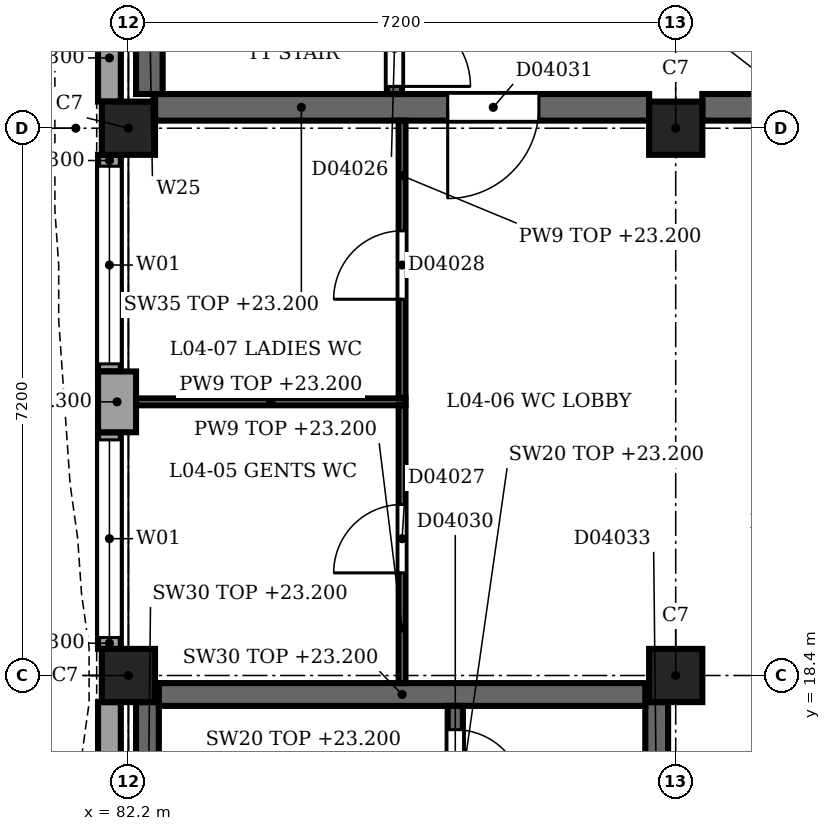
"""IFC4 building model, lengths in metres.
Left out: names, types, materials, properties, quantities, classifications, styles, units other than length and angle.
Written with IfcOpenShell. Run it as: python <this file> out.ifc"""

import sys

from ifc_helpers import new_model, si_unit, direction, frame, frame_2d, origin, origin_2d, place, context, subcontext, project, spatial, rectangle, extrude, element, fill, save


model = new_model("IFC4")
c1 = context("Model", 3, precision=1e-05, world=origin(), true_north=direction((0.0, 1.0)))
c2 = subcontext(c1, "Body", "Model", "MODEL_VIEW")
j1 = project(units=[si_unit("LENGTHUNIT", "METRE"), si_unit("PLANEANGLEUNIT", "RADIAN")], contexts=[c1])
p1 = place(None, origin())
s1 = spatial("IfcSite", under=j1, at=p1, CompositionType="ELEMENT")
p2 = place(p1, origin())
s2 = spatial("IfcBuilding", under=s1, at=p2, CompositionType="ELEMENT")
p3 = place(p2, frame((0.0, 0.0, 18.9)))
s3 = spatial("IfcBuildingStorey", under=s2, at=p3, CompositionType="ELEMENT", Elevation=18.9)
for number, where, z_axis, x_axis in (
    (1, (82.2, 18.4, 0.0), (0.0, 0.0, 1.0), (1.0, 0.0, 0.0)),
    (2, (82.2, 25.6, 0.0), (0.0, 0.0, 1.0), (1.0, 0.0, 0.0)),
    (3, (89.4, 18.4, 0.0), (0.0, 0.0, 1.0), (1.0, 0.0, 0.0)),
    (4, (89.4, 25.6, 0.0), (0.0, 0.0, 1.0), (1.0, 0.0, 0.0)),
):
    element("IfcColumn", number, at=place(p3, frame(where, z_axis=z_axis, x_axis=x_axis)), inside=s3, PredefinedType="COLUMN", context=c2, shape_type="SweptSolid", body=[
        extrude(rectangle(XDim=0.7, YDim=0.7, at=origin_2d()), origin(), (0.0, 0.0, 1.0), 4.5),
    ])
p4 = place(p3, frame((82.05, 21.6, 0.0), z_axis=(0.0, 0.0, 1.0), x_axis=(0.0, 1.0, 0.0)))
e5 = element("IfcWall", 5, at=p4, inside=s3, PredefinedType="SOLIDWALL", context=c2, shape_type="SweptSolid", body=[
    extrude(rectangle(XDim=0.8, YDim=0.5, at=frame_2d((0.4, 0.0))), origin(), (0.0, 0.0, 1.0), 3.4),
])
p5 = place(p3, frame((81.95, 15.2, 0.0), z_axis=(0.0, 0.0, 1.0), x_axis=(0.0, 1.0, 0.0)))
e6 = element("IfcWall", 6, at=p5, inside=s3, PredefinedType="SOLIDWALL", context=c2, shape_type="SweptSolid", body=[
    extrude(rectangle(XDim=2.85, YDim=0.3, at=frame_2d((1.425, 0.0))), origin(), (0.0, 0.0, 1.0), 3.4),
])
p6 = place(p3, frame((81.95, 18.75, 0.0), z_axis=(0.0, 0.0, 1.0), x_axis=(0.0, 1.0, 0.0)))
e7 = element("IfcWall", 7, at=p6, inside=s3, PredefinedType="SOLIDWALL", context=c2, shape_type="SweptSolid", body=[
    extrude(rectangle(XDim=2.85, YDim=0.3, at=frame_2d((1.425, 0.0))), origin(), (0.0, 0.0, 1.0), 3.4),
])
p7 = place(p6, frame((0.15, 0.0, 0.9)))
e8 = element("IfcOpeningElement", 8, at=p7, cuts=e7, PredefinedType="OPENING", context=c2, shape_type="SweptSolid", body=[
    extrude(rectangle(XDim=2.6, YDim=2.4, at=frame_2d((1.3, 1.2))), frame((0.0, 0.16, 0.0), z_axis=(0.0, -1.0, 0.0), x_axis=(1.0, 0.0, 0.0)), (0.0, 0.0, 1.0), 0.32),
])
p8 = place(p3, frame((81.95, 22.4, 0.0), z_axis=(0.0, 0.0, 1.0), x_axis=(0.0, 1.0, 0.0)))
e9 = element("IfcWall", 9, at=p8, inside=s3, PredefinedType="SOLIDWALL", context=c2, shape_type="SweptSolid", body=[
    extrude(rectangle(XDim=2.85, YDim=0.3, at=frame_2d((1.425, 0.0))), origin(), (0.0, 0.0, 1.0), 3.4),
])
p9 = place(p8, frame((0.1, 0.0, 0.9)))
e10 = element("IfcOpeningElement", 10, at=p9, cuts=e9, PredefinedType="OPENING", context=c2, shape_type="SweptSolid", body=[
    extrude(rectangle(XDim=2.6, YDim=2.4, at=frame_2d((1.3, 1.2))), frame((0.0, 0.16, 0.0), z_axis=(0.0, -1.0, 0.0), x_axis=(1.0, 0.0, 0.0)), (0.0, 0.0, 1.0), 0.32),
])
p10 = place(p3, frame((81.95, 25.95, 0.0), z_axis=(0.0, 0.0, 1.0), x_axis=(0.0, 1.0, 0.0)))
e11 = element("IfcWall", 11, at=p10, inside=s3, PredefinedType="SOLIDWALL", context=c2, shape_type="SweptSolid", body=[
    extrude(rectangle(XDim=2.85, YDim=0.3, at=frame_2d((1.425, 0.0))), origin(), (0.0, 0.0, 1.0), 3.4),
])
p11 = place(p10, frame((1.15, 0.0, 1.2)))
e12 = element("IfcOpeningElement", 12, at=p11, cuts=e11, PredefinedType="OPENING", context=c2, shape_type="SweptSolid", body=[
    extrude(rectangle(XDim=0.6, YDim=1.8, at=frame_2d((0.3, 0.9))), frame((0.0, 0.16, 0.0), z_axis=(0.0, -1.0, 0.0), x_axis=(1.0, 0.0, 0.0)), (0.0, 0.0, 1.0), 0.32),
])
p12 = place(p3, frame((82.55, 25.875, 0.0), z_axis=(0.0, 0.0, 1.0), x_axis=(1.0, 0.0, 0.0)))
e13 = element("IfcWall", 13, at=p12, inside=s3, PredefinedType="SHEAR", context=c2, shape_type="SweptSolid", body=[
    extrude(rectangle(XDim=6.5, YDim=0.35, at=frame_2d((3.25, 0.0))), origin(), (0.0, 0.0, 1.0), 4.3),
])
p13 = place(p12, frame((3.85, 0.0, 0.0)))
e14 = element("IfcOpeningElement", 14, at=p13, cuts=e13, PredefinedType="OPENING", context=c2, shape_type="SweptSolid", body=[
    extrude(rectangle(XDim=1.2, YDim=2.1, at=frame_2d((0.6, 1.05))), frame((0.0, 0.185, 0.0), z_axis=(0.0, -1.0, 0.0), x_axis=(1.0, 0.0, 0.0)), (0.0, 0.0, 1.0), 0.37),
])
p14 = place(p3, frame((89.75, 25.875, 0.0), z_axis=(0.0, 0.0, 1.0), x_axis=(1.0, 0.0, 0.0)))
e15 = element("IfcWall", 15, at=p14, inside=s3, PredefinedType="SHEAR", context=c2, shape_type="SweptSolid", body=[
    extrude(rectangle(XDim=6.5, YDim=0.35, at=frame_2d((3.25, 0.0))), origin(), (0.0, 0.0, 1.0), 4.3),
])
p15 = place(p14, frame((2.65, 0.0, 0.0)))
e16 = element("IfcOpeningElement", 16, at=p15, cuts=e15, PredefinedType="OPENING", context=c2, shape_type="SweptSolid", body=[
    extrude(rectangle(XDim=1.8, YDim=2.1, at=frame_2d((0.9, 1.05))), frame((0.0, 0.185, 0.0), z_axis=(0.0, -1.0, 0.0), x_axis=(1.0, 0.0, 0.0)), (0.0, 0.0, 1.0), 0.37),
])
p16 = place(p3, frame((82.475, 26.05, 0.0), z_axis=(0.0, 0.0, 1.0), x_axis=(0.0, 1.0, 0.0)))
e17 = element("IfcWall", 17, at=p16, inside=s3, PredefinedType="SHEAR", context=c2, shape_type="SweptSolid", body=[
    extrude(rectangle(XDim=6.3, YDim=0.35, at=frame_2d((3.15, 0.0))), origin(), (0.0, 0.0, 1.0), 4.3),
])
p17 = place(p16, frame((1.05, 0.0, 1.2)))
e18 = element("IfcOpeningElement", 18, at=p17, cuts=e17, PredefinedType="OPENING", context=c2, shape_type="SweptSolid", body=[
    extrude(rectangle(XDim=0.6, YDim=1.8, at=frame_2d((0.3, 0.9))), frame((0.0, 0.185, 0.0), z_axis=(0.0, -1.0, 0.0), x_axis=(1.0, 0.0, 0.0)), (0.0, 0.0, 1.0), 0.37),
])
p18 = place(p16, frame((4.65, 0.0, 1.2)))
e19 = element("IfcOpeningElement", 19, at=p18, cuts=e17, PredefinedType="OPENING", context=c2, shape_type="SweptSolid", body=[
    extrude(rectangle(XDim=0.6, YDim=1.8, at=frame_2d((0.3, 0.9))), frame((0.0, 0.185, 0.0), z_axis=(0.0, -1.0, 0.0), x_axis=(1.0, 0.0, 0.0)), (0.0, 0.0, 1.0), 0.37),
])
p19 = place(p3, frame((85.7, 26.05, 0.0), z_axis=(0.0, 0.0, 1.0), x_axis=(0.0, 1.0, 0.0)))
e20 = element("IfcWall", 20, at=p19, inside=s3, PredefinedType="SHEAR", context=c2, shape_type="SweptSolid", body=[
    extrude(rectangle(XDim=6.3, YDim=0.2, at=frame_2d((3.15, 0.0))), origin(), (0.0, 0.0, 1.0), 4.3),
])
p20 = place(p19, frame((0.1, 0.0, 0.0)))
e21 = element("IfcOpeningElement", 21, at=p20, cuts=e20, PredefinedType="OPENING", context=c2, shape_type="SweptSolid", body=[
    extrude(rectangle(XDim=1.0, YDim=2.1, at=frame_2d((0.5, 1.05))), frame((0.0, 0.11, 0.0), z_axis=(0.0, -1.0, 0.0), x_axis=(1.0, 0.0, 0.0)), (0.0, 0.0, 1.0), 0.22),
])
p21 = place(p3, frame((89.15, 11.55, 0.0), z_axis=(0.0, 0.0, 1.0), x_axis=(0.0, 1.0, 0.0)))
e22 = element("IfcWall", 22, at=p21, inside=s3, PredefinedType="SHEAR", context=c2, shape_type="SweptSolid", body=[
    extrude(rectangle(XDim=6.5, YDim=0.3, at=frame_2d((3.25, 0.0))), origin(), (0.0, 0.0, 1.0), 4.3),
])
p22 = place(p21, frame((4.25, 0.0, 0.0)))
e23 = element("IfcOpeningElement", 23, at=p22, cuts=e22, PredefinedType="OPENING", context=c2, shape_type="SweptSolid", body=[
    extrude(rectangle(XDim=1.2, YDim=2.1, at=frame_2d((0.6, 1.05))), frame((0.0, 0.16, 0.0), z_axis=(0.0, -1.0, 0.0), x_axis=(1.0, 0.0, 0.0)), (0.0, 0.0, 1.0), 0.32),
])
p23 = place(p3, frame((82.45, 11.55, 0.0), z_axis=(0.0, 0.0, 1.0), x_axis=(0.0, 1.0, 0.0)))
e24 = element("IfcWall", 24, at=p23, inside=s3, PredefinedType="SHEAR", context=c2, shape_type="SweptSolid", body=[
    extrude(rectangle(XDim=6.5, YDim=0.3, at=frame_2d((3.25, 0.0))), origin(), (0.0, 0.0, 1.0), 4.3),
])
p24 = place(p23, frame((1.15, 0.0, 1.2)))
e25 = element("IfcOpeningElement", 25, at=p24, cuts=e24, PredefinedType="OPENING", context=c2, shape_type="SweptSolid", body=[
    extrude(rectangle(XDim=0.6, YDim=1.8, at=frame_2d((0.3, 0.9))), frame((0.0, 0.16, 0.0), z_axis=(0.0, -1.0, 0.0), x_axis=(1.0, 0.0, 0.0)), (0.0, 0.0, 1.0), 0.32),
])
p25 = place(p3, frame((82.6, 18.15, 0.0), z_axis=(0.0, 0.0, 1.0), x_axis=(1.0, 0.0, 0.0)))
e26 = element("IfcWall", 26, at=p25, inside=s3, PredefinedType="SHEAR", context=c2, shape_type="SweptSolid", body=[
    extrude(rectangle(XDim=6.4, YDim=0.3, at=frame_2d((3.2, 0.0))), origin(), (0.0, 0.0, 1.0), 4.3),
])
p26 = place(p3, frame((86.5, 18.0, 0.0), z_axis=(0.0, 0.0, 1.0), x_axis=(0.0, -1.0, 0.0)))
e27 = element("IfcWall", 27, at=p26, inside=s3, PredefinedType="SHEAR", context=c2, shape_type="SweptSolid", body=[
    extrude(rectangle(XDim=3.25, YDim=0.2, at=frame_2d((1.625, 0.0))), origin(), (0.0, 0.0, 1.0), 4.3),
])
p27 = place(p26, frame((2.038, 0.0, 0.0)))
e28 = element("IfcOpeningElement", 28, at=p27, cuts=e27, PredefinedType="OPENING", context=c2, shape_type="SweptSolid", body=[
    extrude(rectangle(XDim=0.9, YDim=2.1, at=frame_2d((0.45, 1.05))), frame((0.0, 0.11, 0.0), z_axis=(0.0, -1.0, 0.0), x_axis=(1.0, 0.0, 0.0)), (0.0, 0.0, 1.0), 0.22),
])
p28 = place(p26, frame((0.312, 0.0, 0.0)))
e29 = element("IfcOpeningElement", 29, at=p28, cuts=e27, PredefinedType="OPENING", context=c2, shape_type="SweptSolid", body=[
    extrude(rectangle(XDim=0.9, YDim=2.1, at=frame_2d((0.45, 1.05))), frame((0.0, 0.11, 0.0), z_axis=(0.0, -1.0, 0.0), x_axis=(1.0, 0.0, 0.0)), (0.0, 0.0, 1.0), 0.22),
])
p29 = place(p3, frame((82.3, 22.0, 0.0), z_axis=(0.0, 0.0, 1.0), x_axis=(1.0, 0.0, 0.0)))
e30 = element("IfcWall", 30, at=p29, inside=s3, PredefinedType="PARTITIONING", context=c2, shape_type="SweptSolid", body=[
    extrude(rectangle(XDim=3.545, YDim=0.09, at=frame_2d((1.772, 0.0))), origin(), (0.0, 0.0, 1.0), 4.3),
])
p30 = place(p3, frame((85.8, 18.3, 0.0), z_axis=(0.0, 0.0, 1.0), x_axis=(0.0, 1.0, 0.0)))
e31 = element("IfcWall", 31, at=p30, inside=s3, PredefinedType="PARTITIONING", context=c2, shape_type="SweptSolid", body=[
    extrude(rectangle(XDim=3.655, YDim=0.09, at=frame_2d((1.828, 0.0))), origin(), (0.0, 0.0, 1.0), 4.3),
])
p31 = place(p30, frame((1.45, 0.0, 0.0)))
e32 = element("IfcOpeningElement", 32, at=p31, cuts=e31, PredefinedType="OPENING", context=c2, shape_type="SweptSolid", body=[
    extrude(rectangle(XDim=0.9, YDim=2.1, at=frame_2d((0.45, 1.05))), frame((0.0, 0.055, 0.0), z_axis=(0.0, -1.0, 0.0), x_axis=(1.0, 0.0, 0.0)), (0.0, 0.0, 1.0), 0.11),
])
p32 = place(p3, frame((85.8, 22.045, 0.0), z_axis=(0.0, 0.0, 1.0), x_axis=(0.0, 1.0, 0.0)))
e33 = element("IfcWall", 33, at=p32, inside=s3, PredefinedType="PARTITIONING", context=c2, shape_type="SweptSolid", body=[
    extrude(rectangle(XDim=3.655, YDim=0.09, at=frame_2d((1.828, 0.0))), origin(), (0.0, 0.0, 1.0), 4.3),
])
p33 = place(p32, frame((1.305, 0.0, 0.0)))
e34 = element("IfcOpeningElement", 34, at=p33, cuts=e33, PredefinedType="OPENING", context=c2, shape_type="SweptSolid", body=[
    extrude(rectangle(XDim=0.9, YDim=2.1, at=frame_2d((0.45, 1.05))), frame((0.0, 0.055, 0.0), z_axis=(0.0, -1.0, 0.0), x_axis=(1.0, 0.0, 0.0)), (0.0, 0.0, 1.0), 0.11),
])
p34 = place(p7, origin())
e35 = element("IfcWindow", 35, at=p34, inside=s3, PartitioningType="SINGLE_PANEL", PredefinedType="WINDOW", context=c2, shape_type="SweptSolid", body=[
    extrude(rectangle(XDim=2.6, YDim=2.4, at=frame_2d((1.3, 1.2))), frame((0.0, 0.03, 0.0), z_axis=(0.0, -1.0, 0.0), x_axis=(1.0, 0.0, 0.0)), (0.0, 0.0, 1.0), 0.06),
])
fill(e8, e35)
p35 = place(p9, origin())
e36 = element("IfcWindow", 36, at=p35, inside=s3, PartitioningType="SINGLE_PANEL", PredefinedType="WINDOW", context=c2, shape_type="SweptSolid", body=[
    extrude(rectangle(XDim=2.6, YDim=2.4, at=frame_2d((1.3, 1.2))), frame((0.0, 0.03, 0.0), z_axis=(0.0, -1.0, 0.0), x_axis=(1.0, 0.0, 0.0)), (0.0, 0.0, 1.0), 0.06),
])
fill(e10, e36)
p36 = place(p13, origin())
e37 = element("IfcDoor", 37, at=p36, inside=s3, OperationType="SINGLE_SWING_RIGHT", PredefinedType="DOOR", context=c2, shape_type="SweptSolid", body=[
    extrude(rectangle(XDim=1.2, YDim=2.1, at=frame_2d((0.6, 1.05))), frame((0.0, 0.025, 0.0), z_axis=(0.0, -1.0, 0.0), x_axis=(1.0, 0.0, 0.0)), (0.0, 0.0, 1.0), 0.05),
])
fill(e14, e37)
p37 = place(p20, origin())
e38 = element("IfcDoor", 38, at=p37, inside=s3, OperationType="SINGLE_SWING_LEFT", PredefinedType="DOOR", context=c2, shape_type="SweptSolid", body=[
    extrude(rectangle(XDim=1.0, YDim=2.1, at=frame_2d((0.5, 1.05))), frame((0.0, 0.025, 0.0), z_axis=(0.0, -1.0, 0.0), x_axis=(1.0, 0.0, 0.0)), (0.0, 0.0, 1.0), 0.05),
])
fill(e21, e38)
p38 = place(p28, origin())
e39 = element("IfcDoor", 39, at=p38, inside=s3, OperationType="SINGLE_SWING_LEFT", PredefinedType="DOOR", context=c2, shape_type="SweptSolid", body=[
    extrude(rectangle(XDim=0.9, YDim=2.1, at=frame_2d((0.45, 1.05))), frame((0.0, 0.025, 0.0), z_axis=(0.0, -1.0, 0.0), x_axis=(1.0, 0.0, 0.0)), (0.0, 0.0, 1.0), 0.05),
])
fill(e29, e39)
p39 = place(p31, origin())
e40 = element("IfcDoor", 40, at=p39, inside=s3, OperationType="SINGLE_SWING_RIGHT", PredefinedType="DOOR", context=c2, shape_type="SweptSolid", body=[
    extrude(rectangle(XDim=0.9, YDim=2.1, at=frame_2d((0.45, 1.05))), frame((0.0, 0.025, 0.0), z_axis=(0.0, -1.0, 0.0), x_axis=(1.0, 0.0, 0.0)), (0.0, 0.0, 1.0), 0.05),
])
fill(e32, e40)
p40 = place(p33, origin())
e41 = element("IfcDoor", 41, at=p40, inside=s3, OperationType="SINGLE_SWING_LEFT", PredefinedType="DOOR", context=c2, shape_type="SweptSolid", body=[
    extrude(rectangle(XDim=0.9, YDim=2.1, at=frame_2d((0.45, 1.05))), frame((0.0, 0.025, 0.0), z_axis=(0.0, -1.0, 0.0), x_axis=(1.0, 0.0, 0.0)), (0.0, 0.0, 1.0), 0.05),
])
fill(e34, e41)
save(model, sys.argv[1])
